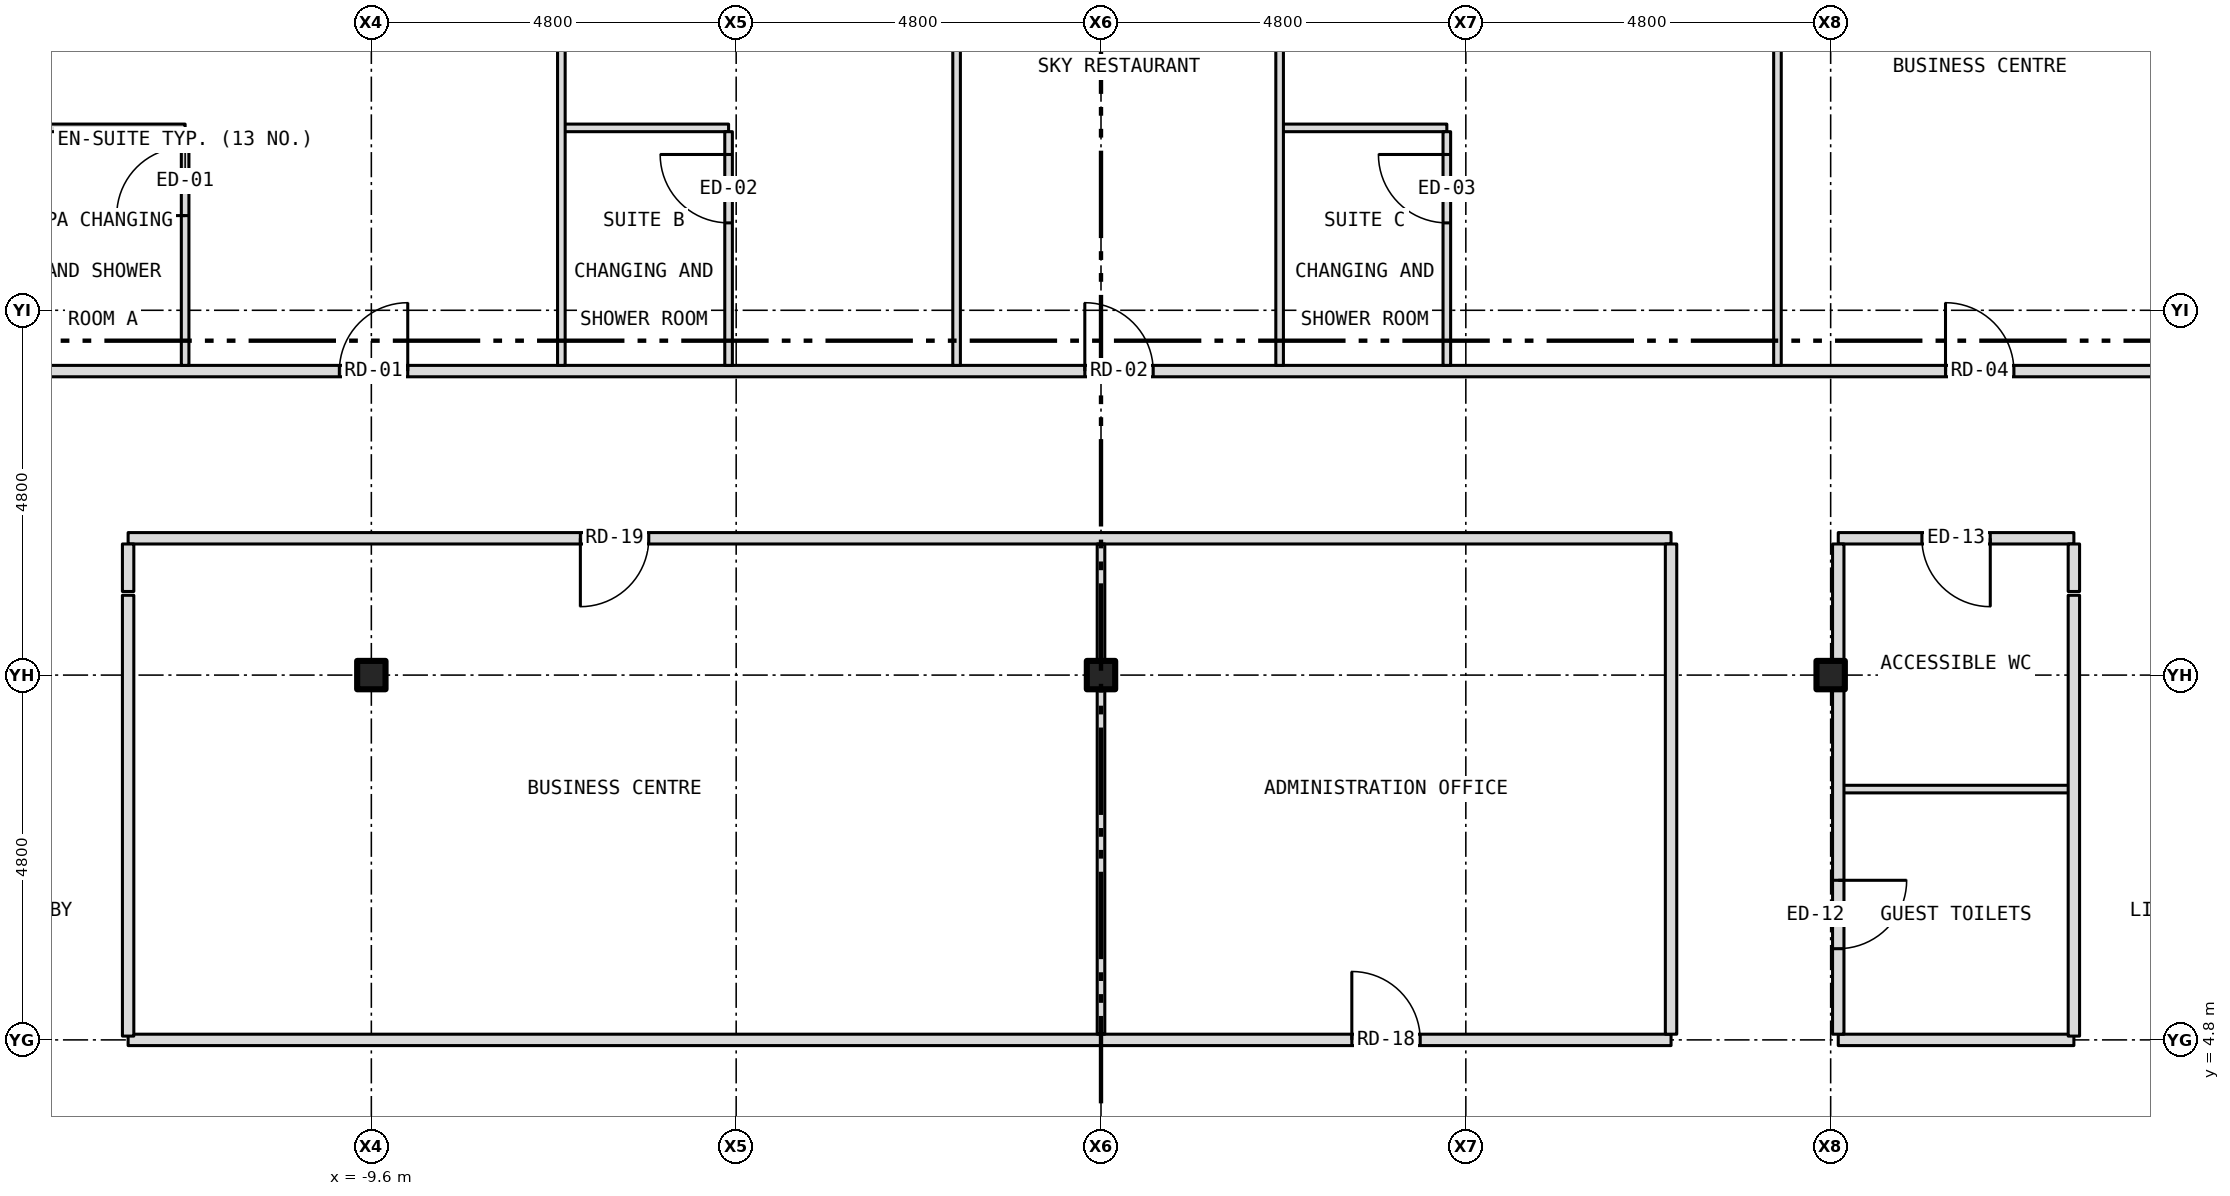
"""IFC4 building model, lengths in metres.
Left out: names, types, materials, properties, quantities, classifications, styles, units other than length and angle.
Written with IfcOpenShell. Run it as: python <this file> out.ifc"""

import sys

from ifc_helpers import new_model, si_unit, direction, frame, frame_2d, origin, origin_2d, place, context, subcontext, project, spatial, rectangle, i_section, extrude, element, fill, save


model = new_model("IFC4")
c1 = context("Model", 3, precision=1e-05, world=origin(), true_north=direction((0.0, 1.0)))
c2 = subcontext(c1, "Body", "Model", "MODEL_VIEW")
j1 = project(units=[si_unit("LENGTHUNIT", "METRE"), si_unit("PLANEANGLEUNIT", "RADIAN")], contexts=[c1])
p1 = place(None, origin())
s1 = spatial("IfcSite", under=j1, at=p1, CompositionType="ELEMENT")
p2 = place(p1, origin())
s2 = spatial("IfcBuilding", under=s1, at=p2, CompositionType="ELEMENT")
p3 = place(p2, frame((0.0, 0.0, 142.5)))
s3 = spatial("IfcBuildingStorey", under=s2, at=p3, CompositionType="ELEMENT", Elevation=142.5)
for number, where, z_axis, x_axis in (
    (1, (-9.6, 9.6, -0.2), (0.0, 0.0, 1.0), (1.0, 0.0, 0.0)),
    (2, (0.0, 9.6, -0.2), (0.0, 0.0, 1.0), (1.0, 0.0, 0.0)),
    (3, (9.6, 9.6, -0.2), (0.0, 0.0, 1.0), (1.0, 0.0, 0.0)),
):
    element("IfcColumn", number, at=place(p3, frame(where, z_axis=z_axis, x_axis=x_axis)), inside=s3, PredefinedType="COLUMN", context=c2, shape_type="SweptSolid", body=[
        extrude(i_section(OverallWidth=0.373, OverallDepth=0.373, WebThickness=0.016, FlangeThickness=0.026, at=origin_2d()), origin(), (0.0, 0.0, 1.0), 5.55),
    ])
p4 = place(p3, frame((-12.8, 4.8, 0.0), z_axis=(0.0, 0.0, 1.0), x_axis=(1.0, 0.0, 0.0)))
e4 = element("IfcWall", 4, at=p4, inside=s3, PredefinedType="PARTITIONING", context=c2, shape_type="SweptSolid", body=[
    extrude(rectangle(XDim=20.3, YDim=0.15, at=frame_2d((10.15, 0.0))), origin(), (0.0, 0.0, 1.0), 5.35),
])
p5 = place(p4, frame((16.1, 0.0, 0.0)))
e5 = element("IfcOpeningElement", 5, at=p5, cuts=e4, PredefinedType="OPENING", context=c2, shape_type="SweptSolid", body=[
    extrude(rectangle(XDim=0.9, YDim=2.1, at=frame_2d((0.45, 1.05))), frame((0.0, 0.087, 0.0), z_axis=(0.0, -1.0, 0.0), x_axis=(1.0, 0.0, 0.0)), (0.0, 0.0, 1.0), 0.174),
])
p6 = place(p3, frame((9.7, 4.8, 0.0), z_axis=(0.0, 0.0, 1.0), x_axis=(1.0, 0.0, 0.0)))
e6 = element("IfcWall", 6, at=p6, inside=s3, PredefinedType="PARTITIONING", context=c2, shape_type="SweptSolid", body=[
    extrude(rectangle(XDim=3.1, YDim=0.15, at=frame_2d((1.55, 0.0))), origin(), (0.0, 0.0, 1.0), 5.35),
])
p7 = place(p3, frame((9.7, 8.1, 0.0), z_axis=(0.0, 0.0, 1.0), x_axis=(1.0, 0.0, 0.0)))
e7 = element("IfcWall", 7, at=p7, inside=s3, PredefinedType="PARTITIONING", context=c2, shape_type="SweptSolid", body=[
    extrude(rectangle(XDim=3.1, YDim=0.1, at=frame_2d((1.55, 0.0))), origin(), (0.0, 0.0, 1.0), 5.35),
])
p8 = place(p3, frame((-12.8, 11.4, 0.0), z_axis=(0.0, 0.0, 1.0), x_axis=(1.0, 0.0, 0.0)))
e8 = element("IfcWall", 8, at=p8, inside=s3, PredefinedType="PARTITIONING", context=c2, shape_type="SweptSolid", body=[
    extrude(rectangle(XDim=20.3, YDim=0.15, at=frame_2d((10.15, 0.0))), origin(), (0.0, 0.0, 1.0), 5.35),
])
p9 = place(p8, frame((5.95, 0.0, 0.0)))
e9 = element("IfcOpeningElement", 9, at=p9, cuts=e8, PredefinedType="OPENING", context=c2, shape_type="SweptSolid", body=[
    extrude(rectangle(XDim=0.9, YDim=2.1, at=frame_2d((0.45, 1.05))), frame((0.0, 0.087, 0.0), z_axis=(0.0, -1.0, 0.0), x_axis=(1.0, 0.0, 0.0)), (0.0, 0.0, 1.0), 0.174),
])
p10 = place(p3, frame((9.7, 11.4, 0.0), z_axis=(0.0, 0.0, 1.0), x_axis=(1.0, 0.0, 0.0)))
e10 = element("IfcWall", 10, at=p10, inside=s3, PredefinedType="PARTITIONING", context=c2, shape_type="SweptSolid", body=[
    extrude(rectangle(XDim=3.1, YDim=0.15, at=frame_2d((1.55, 0.0))), origin(), (0.0, 0.0, 1.0), 5.35),
])
p11 = place(p10, frame((1.1, 0.0, 0.0)))
e11 = element("IfcOpeningElement", 11, at=p11, cuts=e10, PredefinedType="OPENING", context=c2, shape_type="SweptSolid", body=[
    extrude(rectangle(XDim=0.9, YDim=2.1, at=frame_2d((0.45, 1.05))), frame((0.0, 0.087, 0.0), z_axis=(0.0, -1.0, 0.0), x_axis=(1.0, 0.0, 0.0)), (0.0, 0.0, 1.0), 0.174),
])
p12 = place(p3, frame((-15.8, 13.6, 0.0), z_axis=(0.0, 0.0, 1.0), x_axis=(1.0, 0.0, 0.0)))
e12 = element("IfcWall", 12, at=p12, inside=s3, PredefinedType="PARTITIONING", context=c2, shape_type="SweptSolid", body=[
    extrude(rectangle(XDim=31.6, YDim=0.15, at=frame_2d((15.8, 0.0))), origin(), (0.0, 0.0, 1.0), 5.35),
])
p13 = place(p12, frame((5.779, 0.0, 0.0)))
e13 = element("IfcOpeningElement", 13, at=p13, cuts=e12, PredefinedType="OPENING", context=c2, shape_type="SweptSolid", body=[
    extrude(rectangle(XDim=0.9, YDim=2.1, at=frame_2d((0.45, 1.05))), frame((0.0, 0.087, 0.0), z_axis=(0.0, -1.0, 0.0), x_axis=(1.0, 0.0, 0.0)), (0.0, 0.0, 1.0), 0.174),
])
p14 = place(p12, frame((15.587, 0.0, 0.0)))
e14 = element("IfcOpeningElement", 14, at=p14, cuts=e12, PredefinedType="OPENING", context=c2, shape_type="SweptSolid", body=[
    extrude(rectangle(XDim=0.9, YDim=2.1, at=frame_2d((0.45, 1.05))), frame((0.0, 0.087, 0.0), z_axis=(0.0, -1.0, 0.0), x_axis=(1.0, 0.0, 0.0)), (0.0, 0.0, 1.0), 0.174),
])
p15 = place(p12, frame((26.911, 0.0, 0.0)))
e15 = element("IfcOpeningElement", 15, at=p15, cuts=e12, PredefinedType="OPENING", context=c2, shape_type="SweptSolid", body=[
    extrude(rectangle(XDim=0.9, YDim=2.1, at=frame_2d((0.45, 1.05))), frame((0.0, 0.087, 0.0), z_axis=(0.0, -1.0, 0.0), x_axis=(1.0, 0.0, 0.0)), (0.0, 0.0, 1.0), 0.174),
])
p16 = place(p3, frame((-14.25, 16.8, 0.0), z_axis=(0.0, 0.0, 1.0), x_axis=(1.0, 0.0, 0.0)))
e16 = element("IfcWall", 16, at=p16, inside=s3, PredefinedType="PARTITIONING", context=c2, shape_type="SweptSolid", body=[
    extrude(rectangle(XDim=2.2, YDim=0.1, at=frame_2d((1.1, 0.0))), origin(), (0.0, 0.0, 1.0), 5.35),
])
p17 = place(p3, frame((-7.1, 16.8, 0.0), z_axis=(0.0, 0.0, 1.0), x_axis=(1.0, 0.0, 0.0)))
e17 = element("IfcWall", 17, at=p17, inside=s3, PredefinedType="PARTITIONING", context=c2, shape_type="SweptSolid", body=[
    extrude(rectangle(XDim=2.2, YDim=0.1, at=frame_2d((1.1, 0.0))), origin(), (0.0, 0.0, 1.0), 5.35),
])
p18 = place(p3, frame((2.35, 16.8, 0.0), z_axis=(0.0, 0.0, 1.0), x_axis=(1.0, 0.0, 0.0)))
e18 = element("IfcWall", 18, at=p18, inside=s3, PredefinedType="PARTITIONING", context=c2, shape_type="SweptSolid", body=[
    extrude(rectangle(XDim=2.2, YDim=0.1, at=frame_2d((1.1, 0.0))), origin(), (0.0, 0.0, 1.0), 5.35),
])
p19 = place(p3, frame((-12.8, 4.85, 0.0), z_axis=(0.0, 0.0, 1.0), x_axis=(0.0, 1.0, 0.0)))
e19 = element("IfcWall", 19, at=p19, inside=s3, PredefinedType="PARTITIONING", context=c2, shape_type="SweptSolid", body=[
    extrude(rectangle(XDim=5.8, YDim=0.15, at=frame_2d((2.9, 0.0))), origin(), (0.0, 0.0, 1.0), 5.35),
])
p20 = place(p3, frame((-12.8, 10.7, 0.0), z_axis=(0.0, 0.0, 1.0), x_axis=(0.0, 1.0, 0.0)))
e20 = element("IfcWall", 20, at=p20, inside=s3, PredefinedType="PARTITIONING", context=c2, shape_type="SweptSolid", body=[
    extrude(rectangle(XDim=0.625, YDim=0.15, at=frame_2d((0.312, 0.0))), origin(), (0.0, 0.0, 1.0), 5.35),
])
p21 = place(p3, frame((-12.05, 13.675, 0.0), z_axis=(0.0, 0.0, 1.0), x_axis=(0.0, 1.0, 0.0)))
e21 = element("IfcWall", 21, at=p21, inside=s3, PredefinedType="PARTITIONING", context=c2, shape_type="SweptSolid", body=[
    extrude(rectangle(XDim=3.075, YDim=0.1, at=frame_2d((1.538, 0.0))), origin(), (0.0, 0.0, 1.0), 5.35),
])
p22 = place(p21, frame((1.971, 0.0, 0.0)))
e22 = element("IfcOpeningElement", 22, at=p22, cuts=e21, PredefinedType="OPENING", context=c2, shape_type="SweptSolid", body=[
    extrude(rectangle(XDim=0.9, YDim=2.1, at=frame_2d((0.45, 1.05))), frame((0.0, 0.062, 0.0), z_axis=(0.0, -1.0, 0.0), x_axis=(1.0, 0.0, 0.0)), (0.0, 0.0, 1.0), 0.124),
])
p23 = place(p3, frame((-7.1, 13.675, 0.0), z_axis=(0.0, 0.0, 1.0), x_axis=(0.0, 1.0, 0.0)))
e23 = element("IfcWall", 23, at=p23, inside=s3, PredefinedType="PARTITIONING", context=c2, shape_type="SweptSolid", body=[
    extrude(rectangle(XDim=7.805, YDim=0.1, at=frame_2d((3.902, 0.0))), origin(), (0.0, 0.0, 1.0), 5.35),
])
p24 = place(p3, frame((-4.9, 13.675, 0.0), z_axis=(0.0, 0.0, 1.0), x_axis=(0.0, 1.0, 0.0)))
e24 = element("IfcWall", 24, at=p24, inside=s3, PredefinedType="PARTITIONING", context=c2, shape_type="SweptSolid", body=[
    extrude(rectangle(XDim=3.075, YDim=0.1, at=frame_2d((1.538, 0.0))), origin(), (0.0, 0.0, 1.0), 4.817),
])
p25 = place(p24, frame((1.875, 0.0, 0.0)))
e25 = element("IfcOpeningElement", 25, at=p25, cuts=e24, PredefinedType="OPENING", context=c2, shape_type="SweptSolid", body=[
    extrude(rectangle(XDim=0.9, YDim=2.1, at=frame_2d((0.45, 1.05))), frame((0.0, 0.062, 0.0), z_axis=(0.0, -1.0, 0.0), x_axis=(1.0, 0.0, 0.0)), (0.0, 0.0, 1.0), 0.124),
])
p26 = place(p3, frame((-1.9, 13.675, 0.0), z_axis=(0.0, 0.0, 1.0), x_axis=(0.0, 1.0, 0.0)))
e26 = element("IfcWall", 26, at=p26, inside=s3, PredefinedType="PARTITIONING", context=c2, shape_type="SweptSolid", body=[
    extrude(rectangle(XDim=7.805, YDim=0.1, at=frame_2d((3.902, 0.0))), origin(), (0.0, 0.0, 1.0), 5.35),
])
p27 = place(p26, frame((5.075, 0.0, 0.0)))
e27 = element("IfcOpeningElement", 27, at=p27, cuts=e26, PredefinedType="OPENING", context=c2, shape_type="SweptSolid", body=[
    extrude(rectangle(XDim=0.9, YDim=2.1, at=frame_2d((0.45, 1.05))), frame((0.0, 0.062, 0.0), z_axis=(0.0, -1.0, 0.0), x_axis=(1.0, 0.0, 0.0)), (0.0, 0.0, 1.0), 0.124),
])
p28 = place(p3, frame((0.0, 4.875, 0.0), z_axis=(0.0, 0.0, 1.0), x_axis=(0.0, 1.0, 0.0)))
e28 = element("IfcWall", 28, at=p28, inside=s3, PredefinedType="PARTITIONING", context=c2, shape_type="SweptSolid", body=[
    extrude(rectangle(XDim=4.538, YDim=0.1, at=frame_2d((2.269, 0.0))), origin(), (0.0, 0.0, 1.0), 4.728),
])
p29 = place(p3, frame((0.0, 9.413, 0.0), z_axis=(0.0, 0.0, 1.0), x_axis=(0.0, 1.0, 0.0)))
e29 = element("IfcWall", 29, at=p29, inside=s3, PredefinedType="PARTITIONING", context=c2, shape_type="SweptSolid", body=[
    extrude(rectangle(XDim=0.374, YDim=0.1, at=frame_2d((0.187, 0.0))), origin(), (0.0, 0.0, 1.0), 5.35),
])
p30 = place(p3, frame((0.0, 9.787, 0.0), z_axis=(0.0, 0.0, 1.0), x_axis=(0.0, 1.0, 0.0)))
e30 = element("IfcWall", 30, at=p30, inside=s3, PredefinedType="PARTITIONING", context=c2, shape_type="SweptSolid", body=[
    extrude(rectangle(XDim=1.538, YDim=0.1, at=frame_2d((0.769, 0.0))), origin(), (0.0, 0.0, 1.0), 4.728),
])
p31 = place(p3, frame((2.35, 13.675, 0.0), z_axis=(0.0, 0.0, 1.0), x_axis=(0.0, 1.0, 0.0)))
e31 = element("IfcWall", 31, at=p31, inside=s3, PredefinedType="PARTITIONING", context=c2, shape_type="SweptSolid", body=[
    extrude(rectangle(XDim=7.805, YDim=0.1, at=frame_2d((3.902, 0.0))), origin(), (0.0, 0.0, 1.0), 5.35),
])
p32 = place(p3, frame((4.55, 13.675, 0.0), z_axis=(0.0, 0.0, 1.0), x_axis=(0.0, 1.0, 0.0)))
e32 = element("IfcWall", 32, at=p32, inside=s3, PredefinedType="PARTITIONING", context=c2, shape_type="SweptSolid", body=[
    extrude(rectangle(XDim=3.075, YDim=0.1, at=frame_2d((1.538, 0.0))), origin(), (0.0, 0.0, 1.0), 5.35),
])
p33 = place(p32, frame((1.875, 0.0, 0.0)))
e33 = element("IfcOpeningElement", 33, at=p33, cuts=e32, PredefinedType="OPENING", context=c2, shape_type="SweptSolid", body=[
    extrude(rectangle(XDim=0.9, YDim=2.1, at=frame_2d((0.45, 1.05))), frame((0.0, 0.062, 0.0), z_axis=(0.0, -1.0, 0.0), x_axis=(1.0, 0.0, 0.0)), (0.0, 0.0, 1.0), 0.124),
])
p34 = place(p3, frame((7.5, 4.875, 0.0), z_axis=(0.0, 0.0, 1.0), x_axis=(0.0, 1.0, 0.0)))
e34 = element("IfcWall", 34, at=p34, inside=s3, PredefinedType="PARTITIONING", context=c2, shape_type="SweptSolid", body=[
    extrude(rectangle(XDim=6.45, YDim=0.15, at=frame_2d((3.225, 0.0))), origin(), (0.0, 0.0, 1.0), 5.35),
])
p35 = place(p3, frame((8.9, 13.675, 0.0), z_axis=(0.0, 0.0, 1.0), x_axis=(0.0, 1.0, 0.0)))
e35 = element("IfcWall", 35, at=p35, inside=s3, PredefinedType="PARTITIONING", context=c2, shape_type="SweptSolid", body=[
    extrude(rectangle(XDim=8.355, YDim=0.1, at=frame_2d((4.177, 0.0))), origin(), (0.0, 0.0, 1.0), 5.35),
])
p36 = place(p35, frame((5.075, 0.0, 0.0)))
e36 = element("IfcOpeningElement", 36, at=p36, cuts=e35, PredefinedType="OPENING", context=c2, shape_type="SweptSolid", body=[
    extrude(rectangle(XDim=0.9, YDim=2.1, at=frame_2d((0.45, 1.05))), frame((0.0, 0.062, 0.0), z_axis=(0.0, -1.0, 0.0), x_axis=(1.0, 0.0, 0.0)), (0.0, 0.0, 1.0), 0.124),
])
p37 = place(p3, frame((9.7, 4.875, 0.0), z_axis=(0.0, 0.0, 1.0), x_axis=(0.0, 1.0, 0.0)))
e37 = element("IfcWall", 37, at=p37, inside=s3, PredefinedType="PARTITIONING", context=c2, shape_type="SweptSolid", body=[
    extrude(rectangle(XDim=4.538, YDim=0.15, at=frame_2d((2.269, 0.0))), origin(), (0.0, 0.0, 1.0), 4.728),
])
p38 = place(p37, frame((1.125, 0.0, 0.0)))
e38 = element("IfcOpeningElement", 38, at=p38, cuts=e37, PredefinedType="OPENING", context=c2, shape_type="SweptSolid", body=[
    extrude(rectangle(XDim=0.9, YDim=2.1, at=frame_2d((0.45, 1.05))), frame((0.0, 0.087, 0.0), z_axis=(0.0, -1.0, 0.0), x_axis=(1.0, 0.0, 0.0)), (0.0, 0.0, 1.0), 0.174),
])
p39 = place(p3, frame((9.7, 9.413, 0.0), z_axis=(0.0, 0.0, 1.0), x_axis=(0.0, 1.0, 0.0)))
e39 = element("IfcWall", 39, at=p39, inside=s3, PredefinedType="PARTITIONING", context=c2, shape_type="SweptSolid", body=[
    extrude(rectangle(XDim=0.374, YDim=0.15, at=frame_2d((0.187, 0.0))), origin(), (0.0, 0.0, 1.0), 5.35),
])
p40 = place(p3, frame((9.7, 9.787, 0.0), z_axis=(0.0, 0.0, 1.0), x_axis=(0.0, 1.0, 0.0)))
e40 = element("IfcWall", 40, at=p40, inside=s3, PredefinedType="PARTITIONING", context=c2, shape_type="SweptSolid", body=[
    extrude(rectangle(XDim=1.538, YDim=0.15, at=frame_2d((0.769, 0.0))), origin(), (0.0, 0.0, 1.0), 4.728),
])
p41 = place(p3, frame((12.8, 4.85, 0.0), z_axis=(0.0, 0.0, 1.0), x_axis=(0.0, 1.0, 0.0)))
e41 = element("IfcWall", 41, at=p41, inside=s3, PredefinedType="PARTITIONING", context=c2, shape_type="SweptSolid", body=[
    extrude(rectangle(XDim=5.8, YDim=0.15, at=frame_2d((2.9, 0.0))), origin(), (0.0, 0.0, 1.0), 5.35),
])
p42 = place(p3, frame((12.8, 10.7, 0.0), z_axis=(0.0, 0.0, 1.0), x_axis=(0.0, 1.0, 0.0)))
e42 = element("IfcWall", 42, at=p42, inside=s3, PredefinedType="PARTITIONING", context=c2, shape_type="SweptSolid", body=[
    extrude(rectangle(XDim=0.625, YDim=0.15, at=frame_2d((0.312, 0.0))), origin(), (0.0, 0.0, 1.0), 5.35),
])
p43 = place(p13, origin())
e43 = element("IfcDoor", 43, at=p43, inside=s3, OperationType="SINGLE_SWING_RIGHT", PredefinedType="DOOR", context=c2, shape_type="SweptSolid", body=[
    extrude(rectangle(XDim=0.9, YDim=2.1, at=frame_2d((0.45, 1.05))), frame((0.0, 0.025, 0.0), z_axis=(0.0, -1.0, 0.0), x_axis=(1.0, 0.0, 0.0)), (0.0, 0.0, 1.0), 0.05),
])
fill(e13, e43)
p44 = place(p22, origin())
e44 = element("IfcDoor", 44, at=p44, inside=s3, OperationType="SINGLE_SWING_LEFT", PredefinedType="DOOR", context=c2, shape_type="SweptSolid", body=[
    extrude(rectangle(XDim=0.9, YDim=2.1, at=frame_2d((0.45, 1.05))), frame((0.0, 0.025, 0.0), z_axis=(0.0, -1.0, 0.0), x_axis=(1.0, 0.0, 0.0)), (0.0, 0.0, 1.0), 0.05),
])
fill(e22, e44)
p45 = place(p14, origin())
e45 = element("IfcDoor", 45, at=p45, inside=s3, OperationType="SINGLE_SWING_LEFT", PredefinedType="DOOR", context=c2, shape_type="SweptSolid", body=[
    extrude(rectangle(XDim=0.9, YDim=2.1, at=frame_2d((0.45, 1.05))), frame((0.0, 0.025, 0.0), z_axis=(0.0, -1.0, 0.0), x_axis=(1.0, 0.0, 0.0)), (0.0, 0.0, 1.0), 0.05),
])
fill(e14, e45)
p46 = place(p25, origin())
e46 = element("IfcDoor", 46, at=p46, inside=s3, OperationType="SINGLE_SWING_RIGHT", PredefinedType="DOOR", context=c2, shape_type="SweptSolid", body=[
    extrude(rectangle(XDim=0.9, YDim=2.1, at=frame_2d((0.45, 1.05))), frame((0.0, 0.025, 0.0), z_axis=(0.0, -1.0, 0.0), x_axis=(1.0, 0.0, 0.0)), (0.0, 0.0, 1.0), 0.05),
])
fill(e25, e46)
p47 = place(p15, origin())
e47 = element("IfcDoor", 47, at=p47, inside=s3, OperationType="SINGLE_SWING_LEFT", PredefinedType="DOOR", context=c2, shape_type="SweptSolid", body=[
    extrude(rectangle(XDim=0.9, YDim=2.1, at=frame_2d((0.45, 1.05))), frame((0.0, 0.025, 0.0), z_axis=(0.0, -1.0, 0.0), x_axis=(1.0, 0.0, 0.0)), (0.0, 0.0, 1.0), 0.05),
])
fill(e15, e47)
p48 = place(p33, origin())
e48 = element("IfcDoor", 48, at=p48, inside=s3, OperationType="SINGLE_SWING_RIGHT", PredefinedType="DOOR", context=c2, shape_type="SweptSolid", body=[
    extrude(rectangle(XDim=0.9, YDim=2.1, at=frame_2d((0.45, 1.05))), frame((0.0, 0.025, 0.0), z_axis=(0.0, -1.0, 0.0), x_axis=(1.0, 0.0, 0.0)), (0.0, 0.0, 1.0), 0.05),
])
fill(e33, e48)
p49 = place(p38, origin())
e49 = element("IfcDoor", 49, at=p49, inside=s3, OperationType="SINGLE_SWING_RIGHT", PredefinedType="DOOR", context=c2, shape_type="SweptSolid", body=[
    extrude(rectangle(XDim=0.9, YDim=2.1, at=frame_2d((0.45, 1.05))), frame((0.0, 0.025, 0.0), z_axis=(0.0, -1.0, 0.0), x_axis=(1.0, 0.0, 0.0)), (0.0, 0.0, 1.0), 0.05),
])
fill(e38, e49)
p50 = place(p11, origin())
e50 = element("IfcDoor", 50, at=p50, inside=s3, OperationType="SINGLE_SWING_RIGHT", PredefinedType="DOOR", context=c2, shape_type="SweptSolid", body=[
    extrude(rectangle(XDim=0.9, YDim=2.1, at=frame_2d((0.45, 1.05))), frame((0.0, 0.025, 0.0), z_axis=(0.0, -1.0, 0.0), x_axis=(1.0, 0.0, 0.0)), (0.0, 0.0, 1.0), 0.05),
])
fill(e11, e50)
p51 = place(p5, origin())
e51 = element("IfcDoor", 51, at=p51, inside=s3, OperationType="SINGLE_SWING_LEFT", PredefinedType="DOOR", context=c2, shape_type="SweptSolid", body=[
    extrude(rectangle(XDim=0.9, YDim=2.1, at=frame_2d((0.45, 1.05))), frame((0.0, 0.025, 0.0), z_axis=(0.0, -1.0, 0.0), x_axis=(1.0, 0.0, 0.0)), (0.0, 0.0, 1.0), 0.05),
])
fill(e5, e51)
p52 = place(p9, origin())
e52 = element("IfcDoor", 52, at=p52, inside=s3, OperationType="SINGLE_SWING_LEFT", PredefinedType="DOOR", context=c2, shape_type="SweptSolid", body=[
    extrude(rectangle(XDim=0.9, YDim=2.1, at=frame_2d((0.45, 1.05))), frame((0.0, 0.025, 0.0), z_axis=(0.0, -1.0, 0.0), x_axis=(1.0, 0.0, 0.0)), (0.0, 0.0, 1.0), 0.05),
])
fill(e9, e52)
save(model, sys.argv[1])
